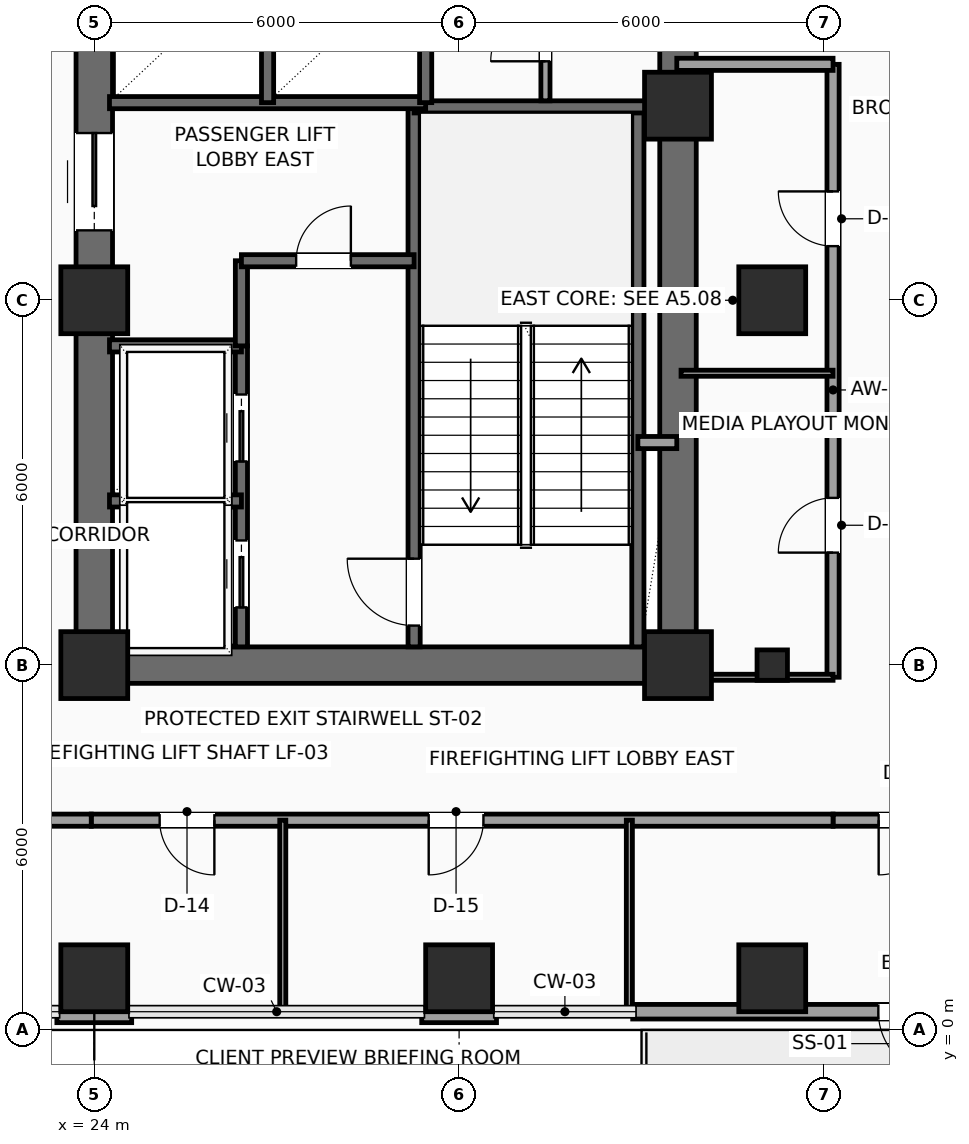
"""IFC4 building model, lengths in metres.
Left out: names, types, materials, properties, quantities, classifications, styles, units other than length and angle.
Written with IfcOpenShell. Run it as: python <this file> out.ifc"""

import sys

from ifc_helpers import new_model, si_unit, direction, frame, frame_2d, origin, origin_2d, place, context, subcontext, project, spatial, rectangle, hollow_rectangle, extrude, element, fill, save


model = new_model("IFC4")
c1 = context("Model", 3, precision=1e-05, world=origin(), true_north=direction((0.0, 1.0)))
c2 = subcontext(c1, "Body", "Model", "MODEL_VIEW")
j1 = project(units=[si_unit("LENGTHUNIT", "METRE"), si_unit("PLANEANGLEUNIT", "RADIAN")], contexts=[c1])
p1 = place(None, origin())
s1 = spatial("IfcSite", under=j1, at=p1, CompositionType="ELEMENT")
p2 = place(p1, origin())
s2 = spatial("IfcBuilding", under=s1, at=p2, CompositionType="ELEMENT")
p3 = place(p2, frame((0.0, 0.0, 138.15)))
s3 = spatial("IfcBuildingStorey", under=s2, at=p3, CompositionType="ELEMENT", Elevation=138.15)
for number, where, z_axis, x_axis in (
    (1, (24.0, 6.0, 0.0), (0.0, 0.0, 1.0), (1.0, 0.0, 0.0)),
    (2, (24.0, 12.0, 0.0), (0.0, 0.0, 1.0), (1.0, 0.0, 0.0)),
    (3, (33.6, 6.0, 0.0), (0.0, 0.0, 1.0), (1.0, 0.0, 0.0)),
    (4, (33.6, 15.2, 0.0), (0.0, 0.0, 1.0), (1.0, 0.0, 0.0)),
    (5, (24.0, 0.85, 0.0), (0.0, 0.0, 1.0), (1.0, 0.0, 0.0)),
    (6, (30.0, 0.85, 0.0), (0.0, 0.0, 1.0), (1.0, 0.0, 0.0)),
    (7, (35.15, 0.85, 0.0), (0.0, 0.0, 1.0), (1.0, 0.0, 0.0)),
):
    element("IfcColumn", number, at=place(p3, frame(where, z_axis=z_axis, x_axis=x_axis)), inside=s3, PredefinedType="COLUMN", context=c2, shape_type="SweptSolid", body=[
        extrude(rectangle(XDim=1.1, YDim=1.1, at=origin_2d()), origin(), (0.0, 0.0, 1.0), 3.75),
    ])
p4 = place(p3, frame((35.15, 6.0, 0.0), z_axis=(0.0, 0.0, 1.0), x_axis=(1.0, 0.0, 0.0)))
e8 = element("IfcColumn", 8, at=p4, inside=s3, PredefinedType="COLUMN", context=c2, shape_type="SweptSolid", body=[
    extrude(hollow_rectangle(XDim=0.5, YDim=0.5, WallThickness=0.025, InnerFilletRadius=0.025, OuterFilletRadius=0.04, at=origin_2d()), origin(), (0.0, 0.0, 1.0), 3.75),
])
p5 = place(p3, frame((35.15, 12.0, 0.0), z_axis=(0.0, 0.0, 1.0), x_axis=(1.0, 0.0, 0.0)))
e9 = element("IfcColumn", 9, at=p5, inside=s3, PredefinedType="COLUMN", context=c2, shape_type="SweptSolid", body=[
    extrude(rectangle(XDim=1.1, YDim=1.1, at=origin_2d()), origin(), (0.0, 0.0, 1.0), 3.75),
])
p6 = place(p3, frame((42.145, 0.3, 0.0), z_axis=(0.0, 0.0, 1.0), x_axis=(-1.0, 0.0, 0.0)))
e10 = element("IfcWall", 10, at=p6, inside=s3, PredefinedType="SOLIDWALL", context=c2, shape_type="SweptSolid", body=[
    extrude(rectangle(XDim=9.29, YDim=0.24, at=frame_2d((4.645, 0.0))), origin(), (0.0, 0.0, 1.0), 3.525),
])
p7 = place(p6, frame((4.2, 0.0, 0.0)))
e11 = element("IfcOpeningElement", 11, at=p7, cuts=e10, PredefinedType="OPENING", context=c2, shape_type="SweptSolid", body=[
    extrude(rectangle(XDim=1.05, YDim=2.2, at=frame_2d((0.525, 1.1))), frame((0.0, 0.13, 0.0), z_axis=(0.0, -1.0, 0.0), x_axis=(1.0, 0.0, 0.0)), (0.0, 0.0, 1.0), 0.26),
])
for number, where, z_axis, x_axis in (
    (12, (30.615, 0.24, 0.0), (0.0, 0.0, 1.0), (-1.0, 0.0, 0.0)),
    (13, (24.615, 0.24, 0.0), (0.0, 0.0, 1.0), (-1.0, 0.0, 0.0)),
):
    element("IfcWall", number, at=place(p3, frame(where, z_axis=z_axis, x_axis=x_axis)), inside=s3, PredefinedType="SOLIDWALL", context=c2, shape_type="SweptSolid", body=[
        extrude(rectangle(XDim=1.23, YDim=0.24, at=frame_2d((0.615, 0.0))), origin(), (0.0, 0.0, 1.0), 3.525),
    ])
p8 = place(p3, frame((24.0, 6.0, 0.0), z_axis=(0.0, 0.0, 1.0), x_axis=(1.0, 0.0, 0.0)))
e14 = element("IfcWall", 14, at=p8, inside=s3, PredefinedType="SHEAR", context=c2, shape_type="SweptSolid", body=[
    extrude(rectangle(XDim=9.6, YDim=0.6, at=frame_2d((4.8, 0.0))), origin(), (0.0, 0.0, 1.0), 3.525),
])
p9 = place(p3, frame((24.0, 6.0, 0.0), z_axis=(0.0, 0.0, 1.0), x_axis=(0.0, 1.0, 0.0)))
e15 = element("IfcWall", 15, at=p9, inside=s3, PredefinedType="SHEAR", context=c2, shape_type="SweptSolid", body=[
    extrude(rectangle(XDim=12.0, YDim=0.6, at=frame_2d((6.0, 0.0))), origin(), (0.0, 0.0, 1.0), 3.525),
])
p10 = place(p9, frame((7.15, 0.0, 0.0)))
e16 = element("IfcOpeningElement", 16, at=p10, cuts=e15, PredefinedType="OPENING", context=c2, shape_type="SweptSolid", body=[
    extrude(rectangle(XDim=1.6, YDim=2.3, at=frame_2d((0.8, 1.15))), frame((0.0, 0.31, 0.0), z_axis=(0.0, -1.0, 0.0), x_axis=(1.0, 0.0, 0.0)), (0.0, 0.0, 1.0), 0.62),
])
p11 = place(p3, frame((33.6, 6.0, 0.0), z_axis=(0.0, 0.0, 1.0), x_axis=(0.0, 1.0, 0.0)))
e17 = element("IfcWall", 17, at=p11, inside=s3, PredefinedType="SHEAR", context=c2, shape_type="SweptSolid", body=[
    extrude(rectangle(XDim=12.0, YDim=0.6, at=frame_2d((6.0, 0.0))), origin(), (0.0, 0.0, 1.0), 3.525),
])
p12 = place(p11, frame((10.15, 0.0, 0.0)))
e18 = element("IfcOpeningElement", 18, at=p12, cuts=e17, PredefinedType="OPENING", context=c2, shape_type="SweptSolid", body=[
    extrude(rectangle(XDim=0.9, YDim=2.15, at=frame_2d((0.45, 1.075))), frame((0.0, 0.31, 0.0), z_axis=(0.0, -1.0, 0.0), x_axis=(1.0, 0.0, 0.0)), (0.0, 0.0, 1.0), 0.62),
])
p13 = place(p3, frame((29.26, 6.3, 0.0), z_axis=(0.0, 0.0, 1.0), x_axis=(0.0, 1.0, 0.0)))
e19 = element("IfcWall", 19, at=p13, inside=s3, PredefinedType="SHEAR", context=c2, shape_type="SweptSolid", body=[
    extrude(rectangle(XDim=8.88, YDim=0.2, at=frame_2d((4.44, 0.0))), origin(), (0.0, 0.0, 1.0), 3.525),
])
p14 = place(p13, frame((0.35, 0.0, 0.0)))
e20 = element("IfcOpeningElement", 20, at=p14, cuts=e19, PredefinedType="OPENING", context=c2, shape_type="SweptSolid", body=[
    extrude(rectangle(XDim=1.1, YDim=2.2, at=frame_2d((0.55, 1.1))), frame((0.0, 0.11, 0.0), z_axis=(0.0, -1.0, 0.0), x_axis=(1.0, 0.0, 0.0)), (0.0, 0.0, 1.0), 0.22),
])
p15 = place(p3, frame((32.94, 6.3, 0.0), z_axis=(0.0, 0.0, 1.0), x_axis=(0.0, 1.0, 0.0)))
e21 = element("IfcWall", 21, at=p15, inside=s3, PredefinedType="SHEAR", context=c2, shape_type="SweptSolid", body=[
    extrude(rectangle(XDim=8.88, YDim=0.2, at=frame_2d((4.44, 0.0))), origin(), (0.0, 0.0, 1.0), 3.525),
])
p16 = place(p3, frame((29.26, 15.18, 0.0), z_axis=(0.0, 0.0, 1.0), x_axis=(1.0, 0.0, 0.0)))
e22 = element("IfcWall", 22, at=p16, inside=s3, PredefinedType="SHEAR", context=c2, shape_type="SweptSolid", body=[
    extrude(rectangle(XDim=4.04, YDim=0.2, at=frame_2d((2.02, 0.0))), origin(), (0.0, 0.0, 1.0), 3.525),
])
p17 = place(p3, frame((26.42, 6.3, 0.0), z_axis=(0.0, 0.0, 1.0), x_axis=(0.0, 1.0, 0.0)))
e23 = element("IfcWall", 23, at=p17, inside=s3, PredefinedType="SHEAR", context=c2, shape_type="SweptSolid", body=[
    extrude(rectangle(XDim=4.95, YDim=0.2, at=frame_2d((2.475, 0.0))), origin(), (0.0, 0.0, 1.0), 3.525),
])
p18 = place(p17, frame((0.65, 0.0, 0.0)))
e24 = element("IfcOpeningElement", 24, at=p18, cuts=e23, PredefinedType="OPENING", context=c2, shape_type="SweptSolid", body=[
    extrude(rectangle(XDim=1.1, YDim=2.2, at=frame_2d((0.55, 1.1))), frame((0.0, 0.11, 0.0), z_axis=(0.0, -1.0, 0.0), x_axis=(1.0, 0.0, 0.0)), (0.0, 0.0, 1.0), 0.22),
])
p19 = place(p17, frame((3.05, 0.0, 0.0)))
e25 = element("IfcOpeningElement", 25, at=p19, cuts=e23, PredefinedType="OPENING", context=c2, shape_type="SweptSolid", body=[
    extrude(rectangle(XDim=1.1, YDim=2.2, at=frame_2d((0.55, 1.1))), frame((0.0, 0.11, 0.0), z_axis=(0.0, -1.0, 0.0), x_axis=(1.0, 0.0, 0.0)), (0.0, 0.0, 1.0), 0.22),
])
for number, where, z_axis, x_axis in (
    (26, (24.25, 8.7, 0.0), (0.0, 0.0, 1.0), (1.0, 0.0, 0.0)),
    (27, (24.25, 11.25, 0.0), (0.0, 0.0, 1.0), (1.0, 0.0, 0.0)),
):
    element("IfcWall", number, at=place(p3, frame(where, z_axis=z_axis, x_axis=x_axis)), inside=s3, PredefinedType="SHEAR", context=c2, shape_type="SweptSolid", body=[
        extrude(rectangle(XDim=2.17, YDim=0.2, at=frame_2d((1.085, 0.0))), origin(), (0.0, 0.0, 1.0), 3.525),
    ])
p20 = place(p3, frame((26.42, 11.25, 0.0), z_axis=(0.0, 0.0, 1.0), x_axis=(0.0, 1.0, 0.0)))
e28 = element("IfcWall", 28, at=p20, inside=s3, PredefinedType="SHEAR", context=c2, shape_type="SweptSolid", body=[
    extrude(rectangle(XDim=1.4, YDim=0.2, at=frame_2d((0.7, 0.0))), origin(), (0.0, 0.0, 1.0), 3.525),
])
p21 = place(p3, frame((26.42, 12.65, 0.0), z_axis=(0.0, 0.0, 1.0), x_axis=(1.0, 0.0, 0.0)))
e29 = element("IfcWall", 29, at=p21, inside=s3, PredefinedType="SHEAR", context=c2, shape_type="SweptSolid", body=[
    extrude(rectangle(XDim=2.84, YDim=0.2, at=frame_2d((1.42, 0.0))), origin(), (0.0, 0.0, 1.0), 3.525),
])
p22 = place(p21, frame((0.9, 0.0, 0.0)))
e30 = element("IfcOpeningElement", 30, at=p22, cuts=e29, PredefinedType="OPENING", context=c2, shape_type="SweptSolid", body=[
    extrude(rectangle(XDim=0.9, YDim=2.15, at=frame_2d((0.45, 1.075))), frame((0.0, 0.11, 0.0), z_axis=(0.0, -1.0, 0.0), x_axis=(1.0, 0.0, 0.0)), (0.0, 0.0, 1.0), 0.22),
])
p23 = place(p3, frame((32.94, 9.66, 0.0), z_axis=(0.0, 0.0, 1.0), x_axis=(1.0, 0.0, 0.0)))
e31 = element("IfcWall", 31, at=p23, inside=s3, PredefinedType="SOLIDWALL", context=c2, shape_type="SweptSolid", body=[
    extrude(rectangle(XDim=0.64, YDim=0.2, at=frame_2d((0.32, 0.0))), origin(), (0.0, 0.0, 1.0), 3.525),
])
p24 = place(p3, frame((24.25, 15.25, 0.0), z_axis=(0.0, 0.0, 1.0), x_axis=(1.0, 0.0, 0.0)))
e32 = element("IfcWall", 32, at=p24, inside=s3, PredefinedType="SHEAR", context=c2, shape_type="SweptSolid", body=[
    extrude(rectangle(XDim=5.2, YDim=0.2, at=frame_2d((2.6, 0.0))), origin(), (0.0, 0.0, 1.0), 3.525),
])
p25 = place(p3, frame((26.85, 15.25, 0.0), z_axis=(0.0, 0.0, 1.0), x_axis=(0.0, 1.0, 0.0)))
e33 = element("IfcWall", 33, at=p25, inside=s3, PredefinedType="SHEAR", context=c2, shape_type="SweptSolid", body=[
    extrude(rectangle(XDim=2.4, YDim=0.2, at=frame_2d((1.2, 0.0))), origin(), (0.0, 0.0, 1.0), 3.525),
])
p26 = place(p3, frame((29.45, 15.25, 0.0), z_axis=(0.0, 0.0, 1.0), x_axis=(0.0, 1.0, 0.0)))
e34 = element("IfcWall", 34, at=p26, inside=s3, PredefinedType="SHEAR", context=c2, shape_type="SweptSolid", body=[
    extrude(rectangle(XDim=2.45, YDim=0.2, at=frame_2d((1.225, 0.0))), origin(), (0.0, 0.0, 1.0), 3.525),
])
p27 = place(p3, frame((31.42, 15.28, 0.0), z_axis=(0.0, 0.0, 1.0), x_axis=(0.0, 1.0, 0.0)))
e35 = element("IfcWall", 35, at=p27, inside=s3, PredefinedType="PARTITIONING", context=c2, shape_type="SweptSolid", body=[
    extrude(rectangle(XDim=2.42, YDim=0.15, at=frame_2d((1.21, 0.0))), origin(), (0.0, 0.0, 1.0), 3.525),
])
p28 = place(p27, frame((0.65, 0.0, 0.0)))
e36 = element("IfcOpeningElement", 36, at=p28, cuts=e35, PredefinedType="OPENING", context=c2, shape_type="SweptSolid", body=[
    extrude(rectangle(XDim=0.9, YDim=2.15, at=frame_2d((0.45, 1.075))), frame((0.0, 0.085, 0.0), z_axis=(0.0, -1.0, 0.0), x_axis=(1.0, 0.0, 0.0)), (0.0, 0.0, 1.0), 0.17),
])
p29 = place(p3, frame((36.15, 5.8, 0.0), z_axis=(0.0, 0.0, 1.0), x_axis=(0.0, 1.0, 0.0)))
e37 = element("IfcWall", 37, at=p29, inside=s3, PredefinedType="PARTITIONING", context=c2, shape_type="SweptSolid", body=[
    extrude(rectangle(XDim=10.08, YDim=0.2, at=frame_2d((5.04, 0.0))), origin(), (0.0, 0.0, 1.0), 3.525),
])
p30 = place(p29, frame((2.05, 0.0, 0.0)))
e38 = element("IfcOpeningElement", 38, at=p30, cuts=e37, PredefinedType="OPENING", context=c2, shape_type="SweptSolid", body=[
    extrude(rectangle(XDim=0.9, YDim=2.1, at=frame_2d((0.45, 1.05))), frame((0.0, 0.11, 0.0), z_axis=(0.0, -1.0, 0.0), x_axis=(1.0, 0.0, 0.0)), (0.0, 0.0, 1.0), 0.22),
])
p31 = place(p29, frame((7.09, 0.0, 0.0)))
e39 = element("IfcOpeningElement", 39, at=p31, cuts=e37, PredefinedType="OPENING", context=c2, shape_type="SweptSolid", body=[
    extrude(rectangle(XDim=0.9, YDim=2.1, at=frame_2d((0.45, 1.05))), frame((0.0, 0.11, 0.0), z_axis=(0.0, -1.0, 0.0), x_axis=(1.0, 0.0, 0.0)), (0.0, 0.0, 1.0), 0.22),
])
p32 = place(p3, frame((36.15, 15.88, 0.0), z_axis=(0.0, 0.0, 1.0), x_axis=(-1.0, 0.0, 0.0)))
e40 = element("IfcWall", 40, at=p32, inside=s3, PredefinedType="PARTITIONING", context=c2, shape_type="SweptSolid", body=[
    extrude(rectangle(XDim=2.57, YDim=0.2, at=frame_2d((1.285, 0.0))), origin(), (0.0, 0.0, 1.0), 3.525),
])
p33 = place(p3, frame((38.55, 3.45, 0.0), z_axis=(0.0, 0.0, 1.0), x_axis=(-1.0, 0.0, 0.0)))
e41 = element("IfcWall", 41, at=p33, inside=s3, PredefinedType="PARTITIONING", context=c2, shape_type="SweptSolid", body=[
    extrude(rectangle(XDim=2.4, YDim=0.2, at=frame_2d((1.2, 0.0))), origin(), (0.0, 0.0, 1.0), 3.067),
])
p34 = place(p33, frame((0.75, 0.0, 0.0)))
e42 = element("IfcOpeningElement", 42, at=p34, cuts=e41, PredefinedType="OPENING", context=c2, shape_type="SweptSolid", body=[
    extrude(rectangle(XDim=0.9, YDim=2.1, at=frame_2d((0.45, 1.05))), frame((0.0, 0.11, 0.0), z_axis=(0.0, -1.0, 0.0), x_axis=(1.0, 0.0, 0.0)), (0.0, 0.0, 1.0), 0.22),
])
p35 = place(p3, frame((36.15, 3.45, 0.0), z_axis=(0.0, 0.0, 1.0), x_axis=(-1.0, 0.0, 0.0)))
e43 = element("IfcWall", 43, at=p35, inside=s3, PredefinedType="PARTITIONING", context=c2, shape_type="SweptSolid", body=[
    extrude(rectangle(XDim=12.2, YDim=0.2, at=frame_2d((6.1, 0.0))), origin(), (0.0, 0.0, 1.0), 3.067),
])
p36 = place(p35, frame((10.175, 0.0, 0.0)))
e44 = element("IfcOpeningElement", 44, at=p36, cuts=e43, PredefinedType="OPENING", context=c2, shape_type="SweptSolid", body=[
    extrude(rectangle(XDim=0.9, YDim=2.1, at=frame_2d((0.45, 1.05))), frame((0.0, 0.11, 0.0), z_axis=(0.0, -1.0, 0.0), x_axis=(1.0, 0.0, 0.0)), (0.0, 0.0, 1.0), 0.22),
])
p37 = place(p35, frame((5.75, 0.0, 0.0)))
e45 = element("IfcOpeningElement", 45, at=p37, cuts=e43, PredefinedType="OPENING", context=c2, shape_type="SweptSolid", body=[
    extrude(rectangle(XDim=0.9, YDim=2.1, at=frame_2d((0.45, 1.05))), frame((0.0, 0.11, 0.0), z_axis=(0.0, -1.0, 0.0), x_axis=(1.0, 0.0, 0.0)), (0.0, 0.0, 1.0), 0.22),
])
p38 = place(p3, frame((23.95, 3.45, 0.0), z_axis=(0.0, 0.0, 1.0), x_axis=(-1.0, 0.0, 0.0)))
e46 = element("IfcWall", 46, at=p38, inside=s3, PredefinedType="PARTITIONING", context=c2, shape_type="SweptSolid", body=[
    extrude(rectangle(XDim=2.6, YDim=0.2, at=frame_2d((1.3, 0.0))), origin(), (0.0, 0.0, 1.0), 3.067),
])
for number, where, z_axis, x_axis in (
    (47, (27.1, 0.3, 0.0), (0.0, 0.0, 1.0), (0.0, 1.0, 0.0)),
    (48, (32.8, 0.3, 0.0), (0.0, 0.0, 1.0), (0.0, 1.0, 0.0)),
):
    element("IfcWall", number, at=place(p3, frame(where, z_axis=z_axis, x_axis=x_axis)), inside=s3, PredefinedType="PARTITIONING", context=c2, shape_type="SweptSolid", body=[
        extrude(rectangle(XDim=3.15, YDim=0.1, at=frame_2d((1.575, 0.0))), origin(), (0.0, 0.0, 1.0), 3.525),
    ])
p39 = place(p3, frame((33.65, 5.8, 0.0), z_axis=(0.0, 0.0, 1.0), x_axis=(1.0, 0.0, 0.0)))
e49 = element("IfcWall", 49, at=p39, inside=s3, PredefinedType="PARTITIONING", context=c2, shape_type="SweptSolid", body=[
    extrude(rectangle(XDim=2.5, YDim=0.1, at=frame_2d((1.25, 0.0))), origin(), (0.0, 0.0, 1.0), 3.017),
])
p40 = place(p3, frame((33.65, 10.8, 0.0), z_axis=(0.0, 0.0, 1.0), x_axis=(1.0, 0.0, 0.0)))
e50 = element("IfcWall", 50, at=p40, inside=s3, PredefinedType="PARTITIONING", context=c2, shape_type="SweptSolid", body=[
    extrude(rectangle(XDim=2.5, YDim=0.1, at=frame_2d((1.25, 0.0))), origin(), (0.0, 0.0, 1.0), 3.525),
])
p41 = place(p7, origin())
e51 = element("IfcDoor", 51, at=p41, inside=s3, OperationType="SINGLE_SWING_LEFT", PredefinedType="DOOR", context=c2, shape_type="SweptSolid", body=[
    extrude(rectangle(XDim=1.05, YDim=2.2, at=frame_2d((0.525, 1.1))), frame((0.0, 0.025, 0.0), z_axis=(0.0, -1.0, 0.0), x_axis=(1.0, 0.0, 0.0)), (0.0, 0.0, 1.0), 0.05),
])
fill(e11, e51)
p42 = place(p10, origin())
e52 = element("IfcDoor", 52, at=p42, inside=s3, OperationType="DOUBLE_DOOR_SLIDING", PredefinedType="DOOR", context=c2, shape_type="SweptSolid", body=[
    extrude(rectangle(XDim=1.6, YDim=2.3, at=frame_2d((0.8, 1.15))), frame((0.0, 0.025, 0.0), z_axis=(0.0, -1.0, 0.0), x_axis=(1.0, 0.0, 0.0)), (0.0, 0.0, 1.0), 0.05),
])
fill(e16, e52)
p43 = place(p14, origin())
e53 = element("IfcDoor", 53, at=p43, inside=s3, OperationType="SINGLE_SWING_RIGHT", PredefinedType="DOOR", context=c2, shape_type="SweptSolid", body=[
    extrude(rectangle(XDim=1.1, YDim=2.2, at=frame_2d((0.55, 1.1))), frame((0.0, 0.025, 0.0), z_axis=(0.0, -1.0, 0.0), x_axis=(1.0, 0.0, 0.0)), (0.0, 0.0, 1.0), 0.05),
])
fill(e20, e53)
p44 = place(p18, origin())
e54 = element("IfcDoor", 54, at=p44, inside=s3, OperationType="SLIDING_TO_LEFT", PredefinedType="DOOR", context=c2, shape_type="SweptSolid", body=[
    extrude(rectangle(XDim=1.1, YDim=2.2, at=frame_2d((0.55, 1.1))), frame((0.0, 0.025, 0.0), z_axis=(0.0, -1.0, 0.0), x_axis=(1.0, 0.0, 0.0)), (0.0, 0.0, 1.0), 0.05),
])
fill(e24, e54)
p45 = place(p19, origin())
e55 = element("IfcDoor", 55, at=p45, inside=s3, OperationType="SLIDING_TO_LEFT", PredefinedType="DOOR", context=c2, shape_type="SweptSolid", body=[
    extrude(rectangle(XDim=1.1, YDim=2.2, at=frame_2d((0.55, 1.1))), frame((0.0, 0.025, 0.0), z_axis=(0.0, -1.0, 0.0), x_axis=(1.0, 0.0, 0.0)), (0.0, 0.0, 1.0), 0.05),
])
fill(e25, e55)
p46 = place(p22, origin())
e56 = element("IfcDoor", 56, at=p46, inside=s3, OperationType="SINGLE_SWING_RIGHT", PredefinedType="DOOR", context=c2, shape_type="SweptSolid", body=[
    extrude(rectangle(XDim=0.9, YDim=2.15, at=frame_2d((0.45, 1.075))), frame((0.0, 0.025, 0.0), z_axis=(0.0, -1.0, 0.0), x_axis=(1.0, 0.0, 0.0)), (0.0, 0.0, 1.0), 0.05),
])
fill(e30, e56)
p47 = place(p28, origin())
e57 = element("IfcDoor", 57, at=p47, inside=s3, OperationType="SINGLE_SWING_LEFT", PredefinedType="DOOR", context=c2, shape_type="SweptSolid", body=[
    extrude(rectangle(XDim=0.9, YDim=2.15, at=frame_2d((0.45, 1.075))), frame((0.0, 0.025, 0.0), z_axis=(0.0, -1.0, 0.0), x_axis=(1.0, 0.0, 0.0)), (0.0, 0.0, 1.0), 0.05),
])
fill(e36, e57)
p48 = place(p30, origin())
e58 = element("IfcDoor", 58, at=p48, inside=s3, OperationType="SINGLE_SWING_LEFT", PredefinedType="DOOR", context=c2, shape_type="SweptSolid", body=[
    extrude(rectangle(XDim=0.9, YDim=2.1, at=frame_2d((0.45, 1.05))), frame((0.0, 0.025, 0.0), z_axis=(0.0, -1.0, 0.0), x_axis=(1.0, 0.0, 0.0)), (0.0, 0.0, 1.0), 0.05),
])
fill(e38, e58)
p49 = place(p31, origin())
e59 = element("IfcDoor", 59, at=p49, inside=s3, OperationType="SINGLE_SWING_RIGHT", PredefinedType="DOOR", context=c2, shape_type="SweptSolid", body=[
    extrude(rectangle(XDim=0.9, YDim=2.1, at=frame_2d((0.45, 1.05))), frame((0.0, 0.025, 0.0), z_axis=(0.0, -1.0, 0.0), x_axis=(1.0, 0.0, 0.0)), (0.0, 0.0, 1.0), 0.05),
])
fill(e39, e59)
p50 = place(p34, origin())
e60 = element("IfcDoor", 60, at=p50, inside=s3, OperationType="SINGLE_SWING_RIGHT", PredefinedType="DOOR", context=c2, shape_type="SweptSolid", body=[
    extrude(rectangle(XDim=0.9, YDim=2.1, at=frame_2d((0.45, 1.05))), frame((0.0, 0.025, 0.0), z_axis=(0.0, -1.0, 0.0), x_axis=(1.0, 0.0, 0.0)), (0.0, 0.0, 1.0), 0.05),
])
fill(e42, e60)
p51 = place(p36, origin())
e61 = element("IfcDoor", 61, at=p51, inside=s3, OperationType="SINGLE_SWING_LEFT", PredefinedType="DOOR", context=c2, shape_type="SweptSolid", body=[
    extrude(rectangle(XDim=0.9, YDim=2.1, at=frame_2d((0.45, 1.05))), frame((0.0, 0.025, 0.0), z_axis=(0.0, -1.0, 0.0), x_axis=(1.0, 0.0, 0.0)), (0.0, 0.0, 1.0), 0.05),
])
fill(e44, e61)
p52 = place(p37, origin())
e62 = element("IfcDoor", 62, at=p52, inside=s3, OperationType="SINGLE_SWING_RIGHT", PredefinedType="DOOR", context=c2, shape_type="SweptSolid", body=[
    extrude(rectangle(XDim=0.9, YDim=2.1, at=frame_2d((0.45, 1.05))), frame((0.0, 0.025, 0.0), z_axis=(0.0, -1.0, 0.0), x_axis=(1.0, 0.0, 0.0)), (0.0, 0.0, 1.0), 0.05),
])
fill(e45, e62)
save(model, sys.argv[1])
